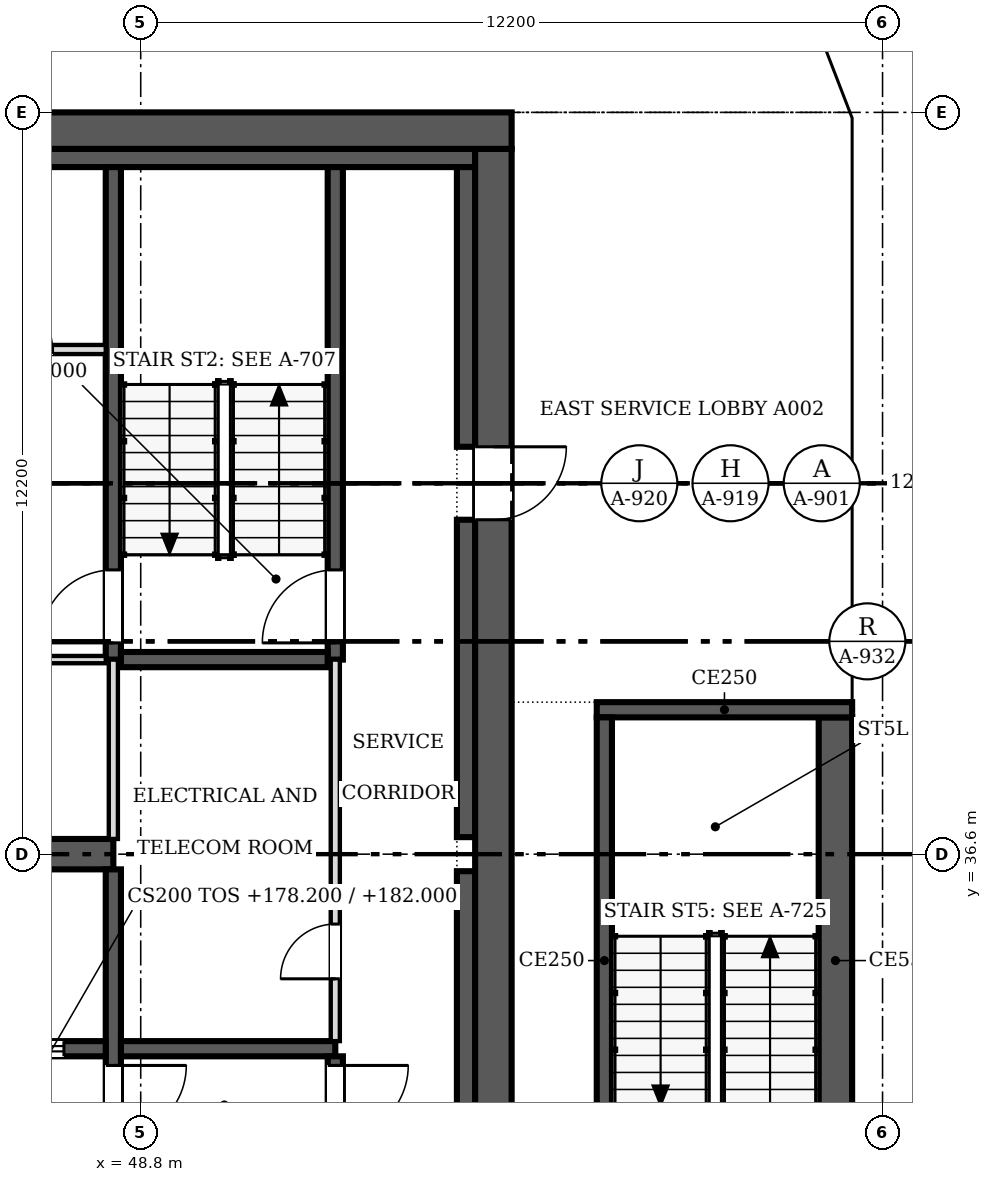
"""IFC4 building model, lengths in metres.
Left out: names, types, materials, properties, quantities, classifications, styles, units other than length and angle.
Written with IfcOpenShell. Run it as: python <this file> out.ifc"""

import sys

from ifc_helpers import new_model, si_unit, direction, frame, frame_2d, origin, place, context, subcontext, project, spatial, polyline, rectangle, outline, extrude, faceted_brep, source, transform, mapped, element, fill, save


model = new_model("IFC4")
c1 = context("Model", 3, precision=1e-05, world=origin(), true_north=direction((0.0, 1.0)))
c2 = subcontext(c1, "Body", "Model", "MODEL_VIEW")
j1 = project(units=[si_unit("LENGTHUNIT", "METRE"), si_unit("PLANEANGLEUNIT", "RADIAN")], contexts=[c1])
p1 = place(None, origin())
s1 = spatial("IfcSite", under=j1, at=p1, CompositionType="ELEMENT")
p2 = place(p1, origin())
s2 = spatial("IfcBuilding", under=s1, at=p2, CompositionType="ELEMENT")
p3 = place(p2, frame((0.0, 0.0, 178.2)))
s3 = spatial("IfcBuildingStorey", under=s2, at=p3, CompositionType="ELEMENT", Elevation=178.2)
m1 = source(origin(), c2, "Body", "SweptSolid", [
    extrude(outline(polyline([(3.05, 0.0), (6.1, 3.8), (3.05, 7.6), (0.0, 3.8), (3.05, 0.0)])), frame((0.0, 0.25, 0.0), z_axis=(0.0, -1.0, 0.0), x_axis=(1.0, 0.0, 0.0)), (0.0, 0.0, 1.0), 0.5),
])
p4 = place(p3, frame((60.75, 30.5, -3.8), z_axis=(0.0, 0.0, 1.0), x_axis=(0.0, 1.0, 0.0)))
e1 = element("IfcWall", 1, at=p4, inside=s3, PredefinedType="SOLIDWALL", context=c2, shape_type="MappedRepresentation", body=[
    mapped(m1, transform((0.0, 0.0, 0.0), scale=1.0)),
])
m2 = source(origin(), c2, "Body", "SweptSolid", [
    extrude(outline(polyline([(3.05, 0.399), (5.78, 3.8), (3.05, 7.201), (0.321, 3.8), (3.05, 0.399)])), frame((0.0, 0.26, 0.0), z_axis=(0.0, -1.0, 0.0), x_axis=(1.0, 0.0, 0.0)), (0.0, 0.0, 1.0), 0.52),
])
p5 = place(p4, origin())
e2 = element("IfcOpeningElement", 2, at=p5, cuts=e1, PredefinedType="OPENING", context=c2, shape_type="MappedRepresentation", body=[
    mapped(m2, transform((0.0, 0.0, 0.0), scale=1.0)),
])
m3 = source(origin(), c2, "Body", "Brep", [
    faceted_brep([(3.05, -0.25, 0.0), (6.1, -0.25, 3.8), (6.1, -0.25, 3.8), (3.05, -0.25, 7.6), (0.0, -0.25, 3.8), (0.0, 0.25, 3.8), (3.05, 0.25, 7.6), (6.1, 0.25, 3.8), (6.1, 0.25, 3.8), (3.05, 0.25, 0.0)], [[[0, 1, 2, 3, 4]], [[5, 6, 7, 8, 9]], [[9, 8, 1, 0]], [[7, 6, 3, 2]], [[6, 5, 4, 3]], [[5, 9, 0, 4]], [[1, 8, 7, 2]]]),
])
p6 = place(p3, frame((60.75, 36.6, -3.8), z_axis=(0.0, 0.0, 1.0), x_axis=(0.0, 1.0, 0.0)))
e3 = element("IfcWall", 3, at=p6, inside=s3, PredefinedType="SOLIDWALL", context=c2, shape_type="MappedRepresentation", body=[
    mapped(m3, transform((0.0, 0.0, 0.0), scale=1.0)),
])
p7 = place(p6, origin())
e4 = element("IfcOpeningElement", 4, at=p7, cuts=e3, PredefinedType="OPENING", context=c2, shape_type="MappedRepresentation", body=[
    mapped(m2, transform((0.0, 0.0, 0.0), scale=1.0)),
])
m4 = source(origin(), c2, "Body", "Brep", [
    faceted_brep([(3.05, -0.25, 0.0), (6.053, -0.25, 3.8), (3.05, -0.25, 7.6), (0.0, -0.25, 3.8), (0.0, 0.25, 3.8), (3.05, 0.25, 7.6), (6.007, 0.25, 3.859), (6.007, 0.25, 3.741), (3.05, 0.25, 0.0), (6.053, 0.0, 3.8)], [[[0, 1, 2, 3]], [[4, 5, 6, 7, 8]], [[8, 7, 9, 1, 0]], [[6, 5, 2, 1, 9]], [[5, 4, 3, 2]], [[4, 8, 0, 3]], [[9, 7, 6]]]),
])
p8 = place(p3, frame((60.75, 42.7, -3.8), z_axis=(0.0, 0.0, 1.0), x_axis=(0.0, 1.0, 0.0)))
e5 = element("IfcWall", 5, at=p8, inside=s3, PredefinedType="SOLIDWALL", context=c2, shape_type="MappedRepresentation", body=[
    mapped(m4, transform((0.0, 0.0, 0.0), scale=1.0)),
])
m5 = source(origin(), c2, "Body", "SweptSolid", [
    extrude(outline(polyline([(3.049, 0.401), (5.735, 3.8), (3.049, 7.199), (0.321, 3.8), (3.049, 0.401)])), frame((0.0, 0.26, 0.0), z_axis=(0.0, -1.0, 0.0), x_axis=(1.0, 0.0, 0.0)), (0.0, 0.0, 1.0), 0.52),
])
p9 = place(p8, origin())
e6 = element("IfcOpeningElement", 6, at=p9, cuts=e5, PredefinedType="OPENING", context=c2, shape_type="MappedRepresentation", body=[
    mapped(m5, transform((0.0, 0.0, 0.0), scale=1.0)),
])
m6 = source(origin(), c2, "Body", "Brep", [
    faceted_brep([(2.95, -0.25, 0.0), (3.003, -0.25, 0.068), (3.003, -0.25, 7.532), (2.95, -0.25, 7.6), (0.0, -0.25, 3.8), (0.047, 0.25, 3.86), (2.898, 0.25, 7.532), (2.898, 0.25, 0.068), (0.047, 0.25, 3.74), (2.95, 0.0, 0.0), (2.95, 0.0, 7.6), (0.0, 0.0, 3.8)], [[[0, 1, 2, 3, 4]], [[5, 6, 7, 8]], [[1, 0, 9]], [[10, 3, 2]], [[6, 5, 11, 4, 3, 10]], [[8, 7, 9, 0, 4, 11]], [[8, 11, 5]], [[1, 9, 7, 6, 10, 2]]]),
])
p10 = place(p3, frame((60.75, 48.753, -3.8), z_axis=(0.0, 0.0, 1.0), x_axis=(-0.35992665181, 0.932980602862, 0.0)))
e7 = element("IfcWall", 7, at=p10, inside=s3, PredefinedType="SOLIDWALL", context=c2, shape_type="MappedRepresentation", body=[
    mapped(m6, transform((0.0, 0.0, 0.0), scale=1.0)),
])
m7 = source(origin(), c2, "Body", "SweptSolid", [
    extrude(outline(polyline([(2.75, 6.935), (0.316, 3.8), (2.75, 0.665), (2.75, 6.935)])), frame((0.0, 0.26, 0.0), z_axis=(0.0, -1.0, 0.0), x_axis=(1.0, 0.0, 0.0)), (0.0, 0.0, 1.0), 0.52),
])
p11 = place(p10, origin())
e8 = element("IfcOpeningElement", 8, at=p11, cuts=e7, PredefinedType="OPENING", context=c2, shape_type="MappedRepresentation", body=[
    mapped(m7, transform((0.0, 0.0, 0.0), scale=1.0)),
])
p12 = place(p2, frame((0.0, 0.0, 182.0)))
s4 = spatial("IfcBuildingStorey", under=s2, at=p12, CompositionType="ELEMENT", Elevation=182.0)
p13 = place(p12, frame((60.75, 27.45, -3.8), z_axis=(0.0, 0.0, 1.0), x_axis=(0.0, 1.0, 0.0)))
e9 = element("IfcWall", 9, at=p13, inside=s4, PredefinedType="SOLIDWALL", context=c2, shape_type="MappedRepresentation", body=[
    mapped(m1, transform((0.0, 0.0, 0.0), scale=1.0)),
])
p14 = place(p13, origin())
e10 = element("IfcOpeningElement", 10, at=p14, cuts=e9, PredefinedType="OPENING", context=c2, shape_type="MappedRepresentation", body=[
    mapped(m2, transform((0.0, 0.0, 0.0), scale=1.0)),
])
p15 = place(p12, frame((60.75, 33.55, -3.8), z_axis=(0.0, 0.0, 1.0), x_axis=(0.0, 1.0, 0.0)))
e11 = element("IfcWall", 11, at=p15, inside=s4, PredefinedType="SOLIDWALL", context=c2, shape_type="MappedRepresentation", body=[
    mapped(m3, transform((0.0, 0.0, 0.0), scale=1.0)),
])
p16 = place(p15, origin())
e12 = element("IfcOpeningElement", 12, at=p16, cuts=e11, PredefinedType="OPENING", context=c2, shape_type="MappedRepresentation", body=[
    mapped(m2, transform((0.0, 0.0, 0.0), scale=1.0)),
])
p17 = place(p12, frame((60.75, 39.65, -3.8), z_axis=(0.0, 0.0, 1.0), x_axis=(0.0, 1.0, 0.0)))
e13 = element("IfcWall", 13, at=p17, inside=s4, PredefinedType="SOLIDWALL", context=c2, shape_type="MappedRepresentation", body=[
    mapped(m1, transform((0.0, 0.0, 0.0), scale=1.0)),
])
p18 = place(p17, origin())
e14 = element("IfcOpeningElement", 14, at=p18, cuts=e13, PredefinedType="OPENING", context=c2, shape_type="MappedRepresentation", body=[
    mapped(m2, transform((0.0, 0.0, 0.0), scale=1.0)),
])
m8 = source(origin(), c2, "Body", "Brep", [
    faceted_brep([(3.003, -0.25, 0.0), (3.05, -0.25, 0.06), (3.05, -0.25, 7.54), (3.003, -0.25, 7.6), (0.0, -0.25, 3.8), (0.0, 0.25, 3.8), (2.957, 0.25, 7.541), (2.957, 0.25, 0.059), (3.003, 0.0, 0.0), (3.003, 0.0, 7.6)], [[[0, 1, 2, 3, 4]], [[5, 6, 7]], [[1, 0, 8]], [[9, 3, 2]], [[6, 5, 4, 3, 9]], [[5, 7, 8, 0, 4]], [[1, 8, 7, 6, 9, 2]]]),
])
p19 = place(p12, frame((60.75, 45.75, -3.8), z_axis=(0.0, 0.0, 1.0), x_axis=(0.0, 1.0, 0.0)))
e15 = element("IfcWall", 15, at=p19, inside=s4, PredefinedType="SOLIDWALL", context=c2, shape_type="MappedRepresentation", body=[
    mapped(m8, transform((0.0, 0.0, 0.0), scale=1.0)),
])
m9 = source(origin(), c2, "Body", "SweptSolid", [
    extrude(outline(polyline([(2.803, 6.944), (0.319, 3.8), (2.803, 0.656), (2.803, 6.944)])), frame((0.0, 0.26, 0.0), z_axis=(0.0, -1.0, 0.0), x_axis=(1.0, 0.0, 0.0)), (0.0, 0.0, 1.0), 0.52),
])
p20 = place(p19, origin())
e16 = element("IfcOpeningElement", 16, at=p20, cuts=e15, PredefinedType="OPENING", context=c2, shape_type="MappedRepresentation", body=[
    mapped(m9, transform((0.0, 0.0, 0.0), scale=1.0)),
])
m10 = source(origin(), c2, "Body", "Brep", [
    faceted_brep([(0.047, -0.25, 0.0), (2.997, -0.25, 3.8), (0.047, -0.25, 7.6), (0.0, -0.25, 7.541), (0.0, -0.25, 0.059), (0.093, 0.25, 7.54), (2.944, 0.25, 3.868), (2.944, 0.25, 3.732), (0.093, 0.25, 0.06), (2.997, 0.0, 3.8), (0.047, 0.0, 0.0), (0.047, 0.0, 7.6)], [[[0, 1, 2, 3, 4]], [[5, 6, 7, 8]], [[8, 7, 9, 1, 0, 10]], [[6, 5, 11, 2, 1, 9]], [[3, 2, 11]], [[10, 0, 4]], [[8, 10, 4, 3, 11, 5]], [[9, 7, 6]]]),
])
p21 = place(p12, frame((60.767, 48.71, -3.8), z_axis=(0.0, 0.0, 1.0), x_axis=(-0.359901446078, 0.932990326376, 0.0)))
e17 = element("IfcWall", 17, at=p21, inside=s4, PredefinedType="SOLIDWALL", context=c2, shape_type="MappedRepresentation", body=[
    mapped(m10, transform((0.0, 0.0, 0.0), scale=1.0)),
])
m11 = source(origin(), c2, "Body", "SweptSolid", [
    extrude(outline(polyline([(0.247, 0.665), (2.681, 3.8), (0.247, 6.935), (0.247, 0.665)])), frame((0.0, 0.26, 0.0), z_axis=(0.0, -1.0, 0.0), x_axis=(1.0, 0.0, 0.0)), (0.0, 0.0, 1.0), 0.52),
])
p22 = place(p21, origin())
e18 = element("IfcOpeningElement", 18, at=p22, cuts=e17, PredefinedType="OPENING", context=c2, shape_type="MappedRepresentation", body=[
    mapped(m11, transform((0.0, 0.0, 0.0), scale=1.0)),
])
p23 = place(p3, frame((30.5, 48.5, 0.0), z_axis=(0.0, 0.0, 1.0), x_axis=(1.0, 0.0, 0.0)))
e19 = element("IfcWall", 19, at=p23, inside=s3, PredefinedType="SHEAR", context=c2, shape_type="SweptSolid", body=[
    extrude(rectangle(XDim=24.4, YDim=0.6, at=frame_2d((12.2, 0.0))), origin(), (0.0, 0.0, 1.0), 3.8),
])
p24 = place(p3, frame((54.6, 48.2, 0.0), z_axis=(0.0, 0.0, 1.0), x_axis=(0.0, -1.0, 0.0)))
e20 = element("IfcWall", 20, at=p24, inside=s3, PredefinedType="SHEAR", context=c2, shape_type="SweptSolid", body=[
    extrude(rectangle(XDim=23.2, YDim=0.6, at=frame_2d((11.6, 0.0))), origin(), (0.0, 0.0, 1.0), 3.8),
])
m12 = source(origin(), c2, "Body", "SweptSolid", [
    extrude(rectangle(XDim=1.2, YDim=2.1, at=frame_2d((0.6, 1.05))), frame((0.0, 0.31, 0.0), z_axis=(0.0, -1.0, 0.0), x_axis=(1.0, 0.0, 0.0)), (0.0, 0.0, 1.0), 0.62),
])
p25 = place(p24, frame((4.9, 0.0, 0.0)))
e21 = element("IfcOpeningElement", 21, at=p25, cuts=e20, PredefinedType="OPENING", context=c2, shape_type="MappedRepresentation", body=[
    mapped(m12, transform((0.0, 0.0, 0.0), scale=1.0)),
])
p26 = place(p3, frame((31.1, 48.05, 0.0), z_axis=(0.0, 0.0, 1.0), x_axis=(1.0, 0.0, 0.0)))
e22 = element("IfcWall", 22, at=p26, inside=s3, PredefinedType="SOLIDWALL", context=c2, shape_type="SweptSolid", body=[
    extrude(rectangle(XDim=23.2, YDim=0.3, at=frame_2d((11.6, 0.0))), origin(), (0.0, 0.0, 1.0), 3.8),
])
p27 = place(p3, frame((54.15, 25.3, 0.0), z_axis=(0.0, 0.0, 1.0), x_axis=(0.0, 1.0, 0.0)))
e23 = element("IfcWall", 23, at=p27, inside=s3, PredefinedType="SOLIDWALL", context=c2, shape_type="SweptSolid", body=[
    extrude(rectangle(XDim=11.02, YDim=0.3, at=frame_2d((5.51, 0.0))), origin(), (0.0, 0.0, 1.0), 3.8),
])
p28 = place(p3, frame((54.15, 36.88, 0.0), z_axis=(0.0, 0.0, 1.0), x_axis=(0.0, 1.0, 0.0)))
e24 = element("IfcWall", 24, at=p28, inside=s3, PredefinedType="SOLIDWALL", context=c2, shape_type="SweptSolid", body=[
    extrude(rectangle(XDim=5.22, YDim=0.3, at=frame_2d((2.61, 0.0))), origin(), (0.0, 0.0, 1.0), 3.8),
])
p29 = place(p3, frame((54.15, 43.3, 0.0), z_axis=(0.0, 0.0, 1.0), x_axis=(0.0, 1.0, 0.0)))
e25 = element("IfcWall", 25, at=p29, inside=s3, PredefinedType="SOLIDWALL", context=c2, shape_type="SweptSolid", body=[
    extrude(rectangle(XDim=4.6, YDim=0.3, at=frame_2d((2.3, 0.0))), origin(), (0.0, 0.0, 1.0), 3.8),
])
p30 = place(p3, frame((31.4, 36.6, 0.0), z_axis=(0.0, 0.0, 1.0), x_axis=(1.0, 0.0, 0.0)))
e26 = element("IfcWall", 26, at=p30, inside=s3, PredefinedType="SHEAR", context=c2, shape_type="SweptSolid", body=[
    extrude(rectangle(XDim=16.95, YDim=0.5, at=frame_2d((8.475, 0.0))), origin(), (0.0, 0.0, 1.0), 3.8),
])
p31 = place(p3, frame((48.35, 36.35, 0.0), z_axis=(0.0, 0.0, 1.0), x_axis=(0.0, -1.0, 0.0)))
e27 = element("IfcWall", 27, at=p31, inside=s3, PredefinedType="SOLIDWALL", context=c2, shape_type="SweptSolid", body=[
    extrude(rectangle(XDim=11.05, YDim=0.25, at=frame_2d((5.525, 0.0))), origin(), (0.0, 0.0, 1.0), 3.8),
])
m13 = source(origin(), c2, "Body", "SweptSolid", [
    extrude(rectangle(XDim=1.2, YDim=2.1, at=frame_2d((0.6, 1.05))), frame((0.0, 0.135, 0.0), z_axis=(0.0, -1.0, 0.0), x_axis=(1.0, 0.0, 0.0)), (0.0, 0.0, 1.0), 0.27),
])
p32 = place(p31, frame((3.225, 0.0, 0.0)))
e28 = element("IfcOpeningElement", 28, at=p32, cuts=e27, PredefinedType="OPENING", context=c2, shape_type="MappedRepresentation", body=[
    mapped(m13, transform((0.0, 0.0, 0.0), scale=1.0)),
])
p33 = place(p3, frame((48.225, 33.4, 0.0), z_axis=(0.0, 0.0, 1.0), x_axis=(-1.0, 0.0, 0.0)))
e29 = element("IfcWall", 29, at=p33, inside=s3, PredefinedType="SOLIDWALL", context=c2, shape_type="SweptSolid", body=[
    extrude(rectangle(XDim=5.275, YDim=0.25, at=frame_2d((2.638, 0.0))), origin(), (0.0, 0.0, 1.0), 3.8),
])
p34 = place(p33, frame((3.512, 0.0, 0.0)))
e30 = element("IfcOpeningElement", 30, at=p34, cuts=e29, PredefinedType="OPENING", context=c2, shape_type="MappedRepresentation", body=[
    mapped(m13, transform((0.0, 0.0, 0.0), scale=1.0)),
])
p35 = place(p33, frame((0.688, 0.0, 0.0)))
e31 = element("IfcOpeningElement", 31, at=p35, cuts=e29, PredefinedType="OPENING", context=c2, shape_type="MappedRepresentation", body=[
    mapped(m13, transform((0.0, 0.0, 0.0), scale=1.0)),
])
p36 = place(p3, frame((48.475, 33.4, 0.0), z_axis=(0.0, 0.0, 1.0), x_axis=(1.0, 0.0, 0.0)))
e32 = element("IfcWall", 32, at=p36, inside=s3, PredefinedType="SOLIDWALL", context=c2, shape_type="SweptSolid", body=[
    extrude(rectangle(XDim=3.525, YDim=0.25, at=frame_2d((1.762, 0.0))), origin(), (0.0, 0.0, 1.0), 3.8),
])
p37 = place(p3, frame((48.35, 47.9, 0.0), z_axis=(0.0, 0.0, 1.0), x_axis=(0.0, -1.0, 0.0)))
e33 = element("IfcWall", 33, at=p37, inside=s3, PredefinedType="SOLIDWALL", context=c2, shape_type="SweptSolid", body=[
    extrude(rectangle(XDim=8.1, YDim=0.25, at=frame_2d((4.05, 0.0))), origin(), (0.0, 0.0, 1.0), 3.8),
])
p38 = place(p37, frame((6.625, 0.0, 0.0)))
e34 = element("IfcOpeningElement", 34, at=p38, cuts=e33, PredefinedType="OPENING", context=c2, shape_type="MappedRepresentation", body=[
    mapped(m13, transform((0.0, 0.0, 0.0), scale=1.0)),
])
p39 = place(p3, frame((52.0, 25.3, 0.0), z_axis=(0.0, 0.0, 1.0), x_axis=(0.0, 1.0, 0.0)))
e35 = element("IfcWall", 35, at=p39, inside=s3, PredefinedType="SOLIDWALL", context=c2, shape_type="SweptSolid", body=[
    extrude(rectangle(XDim=7.975, YDim=0.25, at=frame_2d((3.987, 0.0))), origin(), (0.0, 0.0, 1.0), 3.8),
])
p40 = place(p39, frame((6.625, 0.0, 0.0)))
e36 = element("IfcOpeningElement", 36, at=p40, cuts=e35, PredefinedType="OPENING", context=c2, shape_type="MappedRepresentation", body=[
    mapped(m13, transform((0.0, 0.0, 0.0), scale=1.0)),
])
p41 = place(p3, frame((52.0, 39.8, 0.0), z_axis=(0.0, 0.0, 1.0), x_axis=(0.0, 1.0, 0.0)))
e37 = element("IfcWall", 37, at=p41, inside=s3, PredefinedType="SOLIDWALL", context=c2, shape_type="SweptSolid", body=[
    extrude(rectangle(XDim=8.1, YDim=0.25, at=frame_2d((4.05, 0.0))), origin(), (0.0, 0.0, 1.0), 3.8),
])
p42 = place(p41, frame((0.275, 0.0, 0.0)))
e38 = element("IfcOpeningElement", 38, at=p42, cuts=e37, PredefinedType="OPENING", context=c2, shape_type="MappedRepresentation", body=[
    mapped(m13, transform((0.0, 0.0, 0.0), scale=1.0)),
])
p43 = place(p3, frame((48.475, 39.8, 0.0), z_axis=(0.0, 0.0, 1.0), x_axis=(1.0, 0.0, 0.0)))
e39 = element("IfcWall", 39, at=p43, inside=s3, PredefinedType="SOLIDWALL", context=c2, shape_type="SweptSolid", body=[
    extrude(rectangle(XDim=3.4, YDim=0.25, at=frame_2d((1.7, 0.0))), origin(), (0.0, 0.0, 1.0), 3.8),
])
p44 = place(p3, frame((52.0, 33.525, 0.0), z_axis=(0.0, 0.0, 1.0), x_axis=(0.0, 1.0, 0.0)))
e40 = element("IfcWall", 40, at=p44, inside=s3, PredefinedType="PARTITIONING", context=c2, shape_type="SweptSolid", body=[
    extrude(rectangle(XDim=6.275, YDim=0.15, at=frame_2d((3.138, 0.0))), origin(), (0.0, 0.0, 1.0), 3.6),
])
m14 = source(origin(), c2, "Body", "SweptSolid", [
    extrude(rectangle(XDim=0.9, YDim=2.1, at=frame_2d((0.45, 1.05))), frame((0.0, 0.085, 0.0), z_axis=(0.0, -1.0, 0.0), x_axis=(1.0, 0.0, 0.0)), (0.0, 0.0, 1.0), 0.17),
])
p45 = place(p44, frame((1.025, 0.0, 0.0)))
e41 = element("IfcOpeningElement", 41, at=p45, cuts=e40, PredefinedType="OPENING", context=c2, shape_type="MappedRepresentation", body=[
    mapped(m14, transform((0.0, 0.0, 0.0), scale=1.0)),
])
p46 = place(p3, frame((48.225, 39.8, 0.0), z_axis=(0.0, 0.0, 1.0), x_axis=(-1.0, 0.0, 0.0)))
e42 = element("IfcWall", 42, at=p46, inside=s3, PredefinedType="PARTITIONING", context=c2, shape_type="SweptSolid", body=[
    extrude(rectangle(XDim=5.275, YDim=0.12, at=frame_2d((2.638, 0.0))), origin(), (0.0, 0.0, 1.0), 3.6),
])
m15 = source(origin(), c2, "Body", "SweptSolid", [
    extrude(rectangle(XDim=0.9, YDim=2.1, at=frame_2d((0.45, 1.05))), frame((0.0, 0.07, 0.0), z_axis=(0.0, -1.0, 0.0), x_axis=(1.0, 0.0, 0.0)), (0.0, 0.0, 1.0), 0.14),
])
p47 = place(p46, frame((2.25, 0.0, 0.0)))
e43 = element("IfcOpeningElement", 43, at=p47, cuts=e42, PredefinedType="OPENING", context=c2, shape_type="MappedRepresentation", body=[
    mapped(m15, transform((0.0, 0.0, 0.0), scale=1.0)),
])
p48 = place(p3, frame((48.35, 36.85, 0.0), z_axis=(0.0, 0.0, 1.0), x_axis=(0.0, 1.0, 0.0)))
e44 = element("IfcWall", 44, at=p48, inside=s3, PredefinedType="PARTITIONING", context=c2, shape_type="SweptSolid", body=[
    extrude(rectangle(XDim=2.95, YDim=0.15, at=frame_2d((1.475, 0.0))), origin(), (0.0, 0.0, 1.0), 3.6),
])
p49 = place(p3, frame((45.6, 44.9, 0.0), z_axis=(0.0, 0.0, 1.0), x_axis=(1.0, 0.0, 0.0)))
e45 = element("IfcWall", 45, at=p49, inside=s3, PredefinedType="PARTITIONING", context=c2, shape_type="SweptSolid", body=[
    extrude(rectangle(XDim=2.625, YDim=0.15, at=frame_2d((1.312, 0.0))), origin(), (0.0, 0.0, 1.0), 3.6),
])
p50 = place(p49, frame((0.85, 0.0, 0.0)))
e46 = element("IfcOpeningElement", 46, at=p50, cuts=e45, PredefinedType="OPENING", context=c2, shape_type="MappedRepresentation", body=[
    mapped(m14, transform((0.0, 0.0, 0.0), scale=1.0)),
])
p51 = place(p3, frame((56.425, 30.85, 0.0), z_axis=(0.0, 0.0, 1.0), x_axis=(0.0, 1.0, 0.0)))
e47 = element("IfcWall", 47, at=p51, inside=s3, PredefinedType="SOLIDWALL", context=c2, shape_type="SweptSolid", body=[
    extrude(rectangle(XDim=8.0, YDim=0.25, at=frame_2d((4.0, 0.0))), origin(), (0.0, 0.0, 1.0), 3.8),
])
p52 = place(p3, frame((56.3, 38.975, 0.0), z_axis=(0.0, 0.0, 1.0), x_axis=(1.0, 0.0, 0.0)))
e48 = element("IfcWall", 48, at=p52, inside=s3, PredefinedType="SOLIDWALL", context=c2, shape_type="SweptSolid", body=[
    extrude(rectangle(XDim=4.2, YDim=0.25, at=frame_2d((2.1, 0.0))), origin(), (0.0, 0.0, 1.0), 3.8),
])
p53 = place(p3, frame((60.225, 38.85, 0.0), z_axis=(0.0, 0.0, 1.0), x_axis=(0.0, -1.0, 0.0)))
e49 = element("IfcWall", 49, at=p53, inside=s3, PredefinedType="SOLIDWALL", context=c2, shape_type="SweptSolid", body=[
    extrude(rectangle(XDim=8.0, YDim=0.55, at=frame_2d((4.0, 0.0))), origin(), (0.0, 0.0, 1.0), 3.8),
])
m16 = source(origin(), c2, "Body", "SweptSolid", [
    extrude(rectangle(XDim=1.2, YDim=2.1, at=frame_2d((0.6, 1.05))), frame((0.0, 0.025, 0.0), z_axis=(0.0, -1.0, 0.0), x_axis=(1.0, 0.0, 0.0)), (0.0, 0.0, 1.0), 0.05),
])
p54 = place(p25, origin())
e50 = element("IfcDoor", 50, at=p54, inside=s3, OperationType="SINGLE_SWING_LEFT", PredefinedType="DOOR", context=c2, shape_type="MappedRepresentation", body=[
    mapped(m16, transform((0.0, 0.0, 0.0), scale=1.0)),
])
fill(e21, e50)
p55 = place(p32, origin())
e51 = element("IfcDoor", 51, at=p55, inside=s3, OperationType="SINGLE_SWING_LEFT", PredefinedType="DOOR", context=c2, shape_type="MappedRepresentation", body=[
    mapped(m16, transform((0.0, 0.0, 0.0), scale=1.0)),
])
fill(e28, e51)
p56 = place(p35, origin())
e52 = element("IfcDoor", 52, at=p56, inside=s3, OperationType="DOUBLE_DOOR_SLIDING", PredefinedType="DOOR", context=c2, shape_type="MappedRepresentation", body=[
    mapped(m16, transform((0.0, 0.0, 0.0), scale=1.0)),
])
fill(e31, e52)
p57 = place(p38, origin())
e53 = element("IfcDoor", 53, at=p57, inside=s3, OperationType="SINGLE_SWING_RIGHT", PredefinedType="DOOR", context=c2, shape_type="MappedRepresentation", body=[
    mapped(m16, transform((0.0, 0.0, 0.0), scale=1.0)),
])
fill(e34, e53)
p58 = place(p40, origin())
e54 = element("IfcDoor", 54, at=p58, inside=s3, OperationType="SINGLE_SWING_RIGHT", PredefinedType="DOOR", context=c2, shape_type="MappedRepresentation", body=[
    mapped(m16, transform((0.0, 0.0, 0.0), scale=1.0)),
])
fill(e36, e54)
p59 = place(p42, origin())
e55 = element("IfcDoor", 55, at=p59, inside=s3, OperationType="SINGLE_SWING_LEFT", PredefinedType="DOOR", context=c2, shape_type="MappedRepresentation", body=[
    mapped(m16, transform((0.0, 0.0, 0.0), scale=1.0)),
])
fill(e38, e55)
m17 = source(origin(), c2, "Body", "SweptSolid", [
    extrude(rectangle(XDim=0.9, YDim=2.1, at=frame_2d((0.45, 1.05))), frame((0.0, 0.025, 0.0), z_axis=(0.0, -1.0, 0.0), x_axis=(1.0, 0.0, 0.0)), (0.0, 0.0, 1.0), 0.05),
])
p60 = place(p45, origin())
e56 = element("IfcDoor", 56, at=p60, inside=s3, OperationType="SINGLE_SWING_LEFT", PredefinedType="DOOR", context=c2, shape_type="MappedRepresentation", body=[
    mapped(m17, transform((0.0, 0.0, 0.0), scale=1.0)),
])
fill(e41, e56)
save(model, sys.argv[1])
